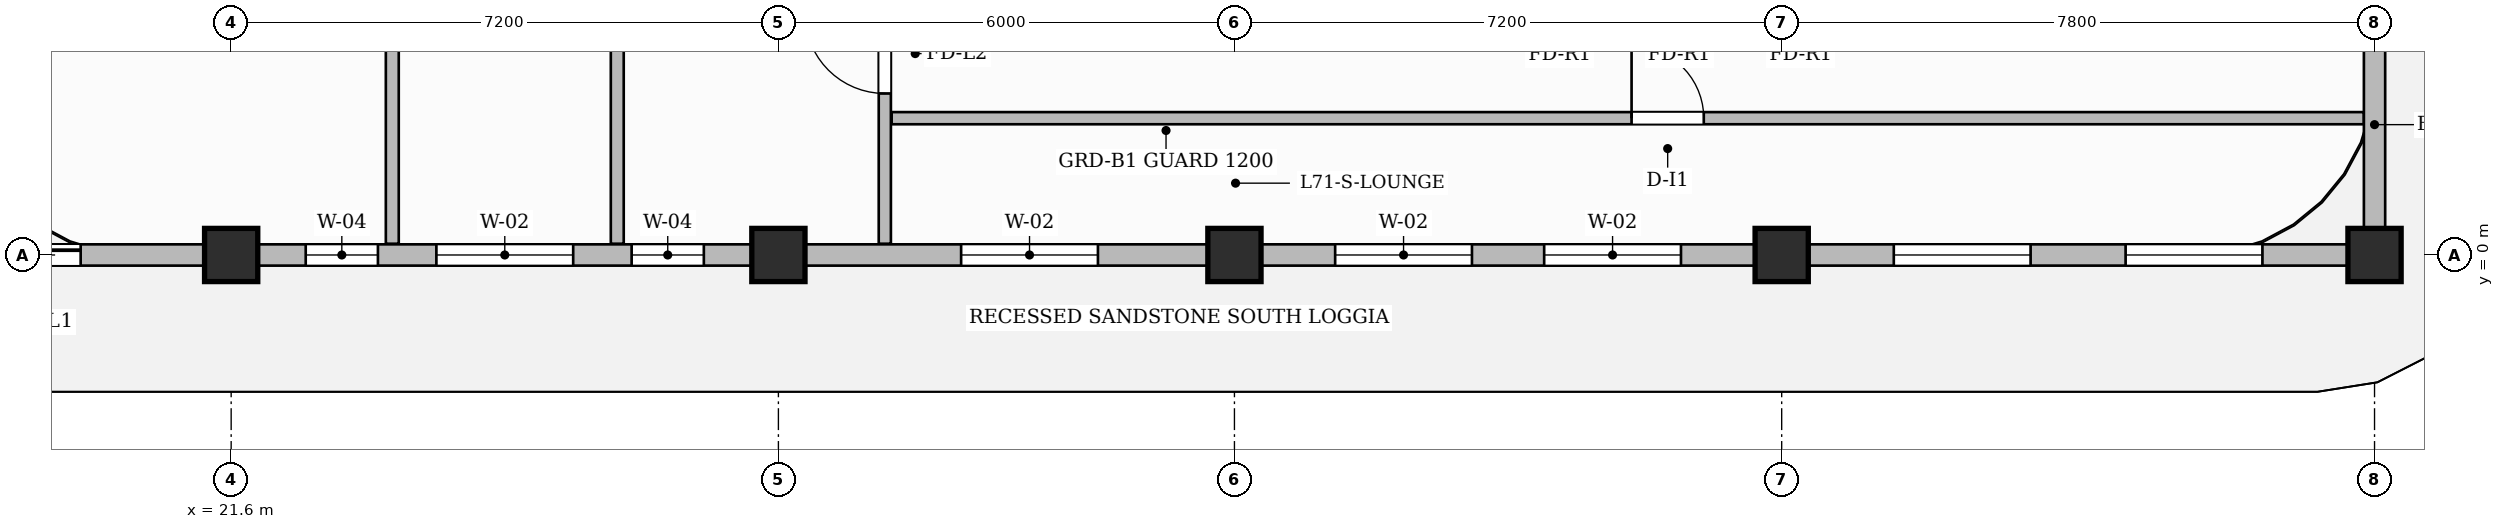
"""IFC4 building model, lengths in metres.
Left out: names, types, materials, properties, quantities, classifications, styles, units other than length and angle.
Written with IfcOpenShell. Run it as: python <this file> out.ifc"""

import sys

from ifc_helpers import new_model, si_unit, direction, frame, frame_2d, origin, origin_2d, place, context, subcontext, project, spatial, rectangle, extrude, source, transform, mapped, element, fill, save


model = new_model("IFC4")
c1 = context("Model", 3, precision=1e-05, world=origin(), true_north=direction((0.0, 1.0)))
c2 = subcontext(c1, "Body", "Model", "MODEL_VIEW")
j1 = project(units=[si_unit("LENGTHUNIT", "METRE"), si_unit("PLANEANGLEUNIT", "RADIAN")], contexts=[c1])
p1 = place(None, origin())
s1 = spatial("IfcSite", under=j1, at=p1, CompositionType="ELEMENT")
p2 = place(p1, origin())
s2 = spatial("IfcBuilding", under=s1, at=p2, CompositionType="ELEMENT")
p3 = place(p2, frame((0.0, 0.0, 282.75)))
s3 = spatial("IfcBuildingStorey", under=s2, at=p3, CompositionType="ELEMENT", Elevation=282.75)
m1 = source(origin(), c2, "Body", "SweptSolid", [
    extrude(rectangle(XDim=0.7, YDim=0.7, at=origin_2d()), origin(), (0.0, 0.0, 1.0), 3.85),
])
for number, where, z_axis, x_axis in (
    (1, (21.6, 0.0, 0.0), (0.0, 0.0, 1.0), (1.0, 0.0, 0.0)),
    (2, (28.8, 0.0, 0.0), (0.0, 0.0, 1.0), (1.0, 0.0, 0.0)),
    (3, (34.8, 0.0, 0.0), (0.0, 0.0, 1.0), (1.0, 0.0, 0.0)),
    (4, (42.0, 0.0, 0.0), (0.0, 0.0, 1.0), (1.0, 0.0, 0.0)),
    (5, (49.8, 0.0, 0.0), (0.0, 0.0, 1.0), (1.0, 0.0, 0.0)),
):
    element("IfcColumn", number, at=place(p3, frame(where, z_axis=z_axis, x_axis=x_axis)), inside=s3, PredefinedType="COLUMN", context=c2, shape_type="MappedRepresentation", body=[
        mapped(m1, transform((0.0, 0.0, 0.0), scale=1.0)),
    ])
p4 = place(p3, frame((30.2, 0.148, 0.0), z_axis=(0.0, 0.0, 1.0), x_axis=(0.0, 1.0, 0.0)))
e6 = element("IfcWall", 6, at=p4, inside=s3, PredefinedType="PARTITIONING", context=c2, shape_type="SweptSolid", body=[
    extrude(rectangle(XDim=9.712, YDim=0.16, at=frame_2d((4.856, 0.0))), origin(), (0.0, 0.0, 1.0), 3.6),
])
p5 = place(p4, frame((1.977, 0.0, 0.0)))
e7 = element("IfcOpeningElement", 7, at=p5, cuts=e6, PredefinedType="OPENING", context=c2, shape_type="SweptSolid", body=[
    extrude(rectangle(XDim=1.05, YDim=2.15, at=frame_2d((0.525, 1.075))), frame((0.0, 0.09, 0.0), z_axis=(0.0, -1.0, 0.0), x_axis=(1.0, 0.0, 0.0)), (0.0, 0.0, 1.0), 0.18),
])
p6 = place(p3, frame((30.29, 1.8, 0.0), z_axis=(0.0, 0.0, 1.0), x_axis=(1.0, 0.0, 0.0)))
e8 = element("IfcWall", 8, at=p6, inside=s3, PredefinedType="PARTITIONING", context=c2, shape_type="SweptSolid", body=[
    extrude(rectangle(XDim=19.37, YDim=0.16, at=frame_2d((9.685, 0.0))), origin(), (0.0, 0.0, 1.0), 3.6),
])
p7 = place(p6, frame((9.735, 0.0, 0.0)))
e9 = element("IfcOpeningElement", 9, at=p7, cuts=e8, PredefinedType="OPENING", context=c2, shape_type="SweptSolid", body=[
    extrude(rectangle(XDim=0.95, YDim=2.15, at=frame_2d((0.475, 1.075))), frame((0.0, 0.09, 0.0), z_axis=(0.0, -1.0, 0.0), x_axis=(1.0, 0.0, 0.0)), (0.0, 0.0, 1.0), 0.18),
])
for number, where, z_axis, x_axis in (
    (10, (23.72, 0.148, 0.0), (0.0, 0.0, 1.0), (0.0, 1.0, 0.0)),
    (11, (26.68, 0.148, 0.0), (0.0, 0.0, 1.0), (0.0, 1.0, 0.0)),
):
    element("IfcWall", number, at=place(p3, frame(where, z_axis=z_axis, x_axis=x_axis)), inside=s3, PredefinedType="PARTITIONING", context=c2, shape_type="SweptSolid", body=[
        extrude(rectangle(XDim=9.712, YDim=0.17, at=frame_2d((4.856, 0.0))), origin(), (0.0, 0.0, 1.0), 3.6),
    ])
p8 = place(p3, frame((18.0, 0.0, 0.0), z_axis=(0.0, 0.0, 1.0), x_axis=(1.0, 0.0, 0.0)))
e12 = element("IfcWall", 12, at=p8, inside=s3, PredefinedType="SOLIDWALL", context=c2, shape_type="SweptSolid", body=[
    extrude(rectangle(XDim=31.8, YDim=0.28, at=frame_2d((15.9, 0.0))), origin(), (0.0, 0.0, 1.0), 3.185),
])
p9 = place(p8, frame((0.42, 0.0, 0.0)))
e13 = element("IfcOpeningElement", 13, at=p9, cuts=e12, PredefinedType="OPENING", context=c2, shape_type="SweptSolid", body=[
    extrude(rectangle(XDim=1.2, YDim=2.2, at=frame_2d((0.6, 1.1))), frame((0.0, 0.15, 0.0), z_axis=(0.0, -1.0, 0.0), x_axis=(1.0, 0.0, 0.0)), (0.0, 0.0, 1.0), 0.3),
])
p10 = place(p8, frame((4.581, 0.0, 0.8)))
e14 = element("IfcOpeningElement", 14, at=p10, cuts=e12, PredefinedType="OPENING", context=c2, shape_type="SweptSolid", body=[
    extrude(rectangle(XDim=0.95, YDim=1.75, at=frame_2d((0.475, 0.875))), frame((0.0, 0.15, 0.0), z_axis=(0.0, -1.0, 0.0), x_axis=(1.0, 0.0, 0.0)), (0.0, 0.0, 1.0), 0.3),
])
p11 = place(p8, frame((6.3, 0.0, 0.8)))
e15 = element("IfcOpeningElement", 15, at=p11, cuts=e12, PredefinedType="OPENING", context=c2, shape_type="SweptSolid", body=[
    extrude(rectangle(XDim=1.8, YDim=1.85, at=frame_2d((0.9, 0.925))), frame((0.0, 0.15, 0.0), z_axis=(0.0, -1.0, 0.0), x_axis=(1.0, 0.0, 0.0)), (0.0, 0.0, 1.0), 0.3),
])
p12 = place(p8, frame((8.869, 0.0, 0.8)))
e16 = element("IfcOpeningElement", 16, at=p12, cuts=e12, PredefinedType="OPENING", context=c2, shape_type="SweptSolid", body=[
    extrude(rectangle(XDim=0.95, YDim=1.75, at=frame_2d((0.475, 0.875))), frame((0.0, 0.15, 0.0), z_axis=(0.0, -1.0, 0.0), x_axis=(1.0, 0.0, 0.0)), (0.0, 0.0, 1.0), 0.3),
])
p13 = place(p8, frame((13.204, 0.0, 0.8)))
e17 = element("IfcOpeningElement", 17, at=p13, cuts=e12, PredefinedType="OPENING", context=c2, shape_type="SweptSolid", body=[
    extrude(rectangle(XDim=1.8, YDim=1.85, at=frame_2d((0.9, 0.925))), frame((0.0, 0.15, 0.0), z_axis=(0.0, -1.0, 0.0), x_axis=(1.0, 0.0, 0.0)), (0.0, 0.0, 1.0), 0.3),
])
p14 = place(p8, frame((18.125, 0.0, 0.8)))
e18 = element("IfcOpeningElement", 18, at=p14, cuts=e12, PredefinedType="OPENING", context=c2, shape_type="SweptSolid", body=[
    extrude(rectangle(XDim=1.8, YDim=1.85, at=frame_2d((0.9, 0.925))), frame((0.0, 0.15, 0.0), z_axis=(0.0, -1.0, 0.0), x_axis=(1.0, 0.0, 0.0)), (0.0, 0.0, 1.0), 0.3),
])
p15 = place(p8, frame((20.875, 0.0, 0.8)))
e19 = element("IfcOpeningElement", 19, at=p15, cuts=e12, PredefinedType="OPENING", context=c2, shape_type="SweptSolid", body=[
    extrude(rectangle(XDim=1.8, YDim=1.85, at=frame_2d((0.9, 0.925))), frame((0.0, 0.15, 0.0), z_axis=(0.0, -1.0, 0.0), x_axis=(1.0, 0.0, 0.0)), (0.0, 0.0, 1.0), 0.3),
])
p16 = place(p8, frame((25.475, 0.0, 0.8)))
e20 = element("IfcOpeningElement", 20, at=p16, cuts=e12, PredefinedType="OPENING", context=c2, shape_type="SweptSolid", body=[
    extrude(rectangle(XDim=1.8, YDim=1.85, at=frame_2d((0.9, 0.925))), frame((0.0, 0.15, 0.0), z_axis=(0.0, -1.0, 0.0), x_axis=(1.0, 0.0, 0.0)), (0.0, 0.0, 1.0), 0.3),
])
p17 = place(p8, frame((28.525, 0.0, 0.8)))
e21 = element("IfcOpeningElement", 21, at=p17, cuts=e12, PredefinedType="OPENING", context=c2, shape_type="SweptSolid", body=[
    extrude(rectangle(XDim=1.8, YDim=1.85, at=frame_2d((0.9, 0.925))), frame((0.0, 0.15, 0.0), z_axis=(0.0, -1.0, 0.0), x_axis=(1.0, 0.0, 0.0)), (0.0, 0.0, 1.0), 0.3),
])
p18 = place(p3, frame((49.8, 0.05, 0.0), z_axis=(0.0, 0.0, 1.0), x_axis=(0.0, 1.0, 0.0)))
e22 = element("IfcWall", 22, at=p18, inside=s3, PredefinedType="SOLIDWALL", context=c2, shape_type="SweptSolid", body=[
    extrude(rectangle(XDim=3.33, YDim=0.28, at=frame_2d((1.665, 0.0))), origin(), (0.0, 0.0, 1.0), 3.6),
])
m2 = source(origin(), c2, "Body", "SweptSolid", [
    extrude(rectangle(XDim=1.05, YDim=2.15, at=frame_2d((0.525, 1.075))), frame((0.0, 0.025, 0.0), z_axis=(0.0, -1.0, 0.0), x_axis=(1.0, 0.0, 0.0)), (0.0, 0.0, 1.0), 0.05),
])
p19 = place(p5, origin())
e23 = element("IfcDoor", 23, at=p19, inside=s3, OperationType="SINGLE_SWING_RIGHT", PredefinedType="DOOR", context=c2, shape_type="MappedRepresentation", body=[
    mapped(m2, transform((0.0, 0.0, 0.0), scale=1.0)),
])
fill(e7, e23)
m3 = source(origin(), c2, "Body", "SweptSolid", [
    extrude(rectangle(XDim=0.95, YDim=2.15, at=frame_2d((0.475, 1.075))), frame((0.0, 0.025, 0.0), z_axis=(0.0, -1.0, 0.0), x_axis=(1.0, 0.0, 0.0)), (0.0, 0.0, 1.0), 0.05),
])
p20 = place(p7, origin())
e24 = element("IfcDoor", 24, at=p20, inside=s3, OperationType="SINGLE_SWING_LEFT", PredefinedType="DOOR", context=c2, shape_type="MappedRepresentation", body=[
    mapped(m3, transform((0.0, 0.0, 0.0), scale=1.0)),
])
fill(e9, e24)
m4 = source(origin(), c2, "Body", "SweptSolid", [
    extrude(rectangle(XDim=1.2, YDim=2.2, at=frame_2d((0.6, 1.1))), frame((0.0, 0.025, 0.0), z_axis=(0.0, -1.0, 0.0), x_axis=(1.0, 0.0, 0.0)), (0.0, 0.0, 1.0), 0.05),
])
p21 = place(p9, origin())
e25 = element("IfcDoor", 25, at=p21, inside=s3, OperationType="SLIDING_TO_LEFT", PredefinedType="DOOR", context=c2, shape_type="MappedRepresentation", body=[
    mapped(m4, transform((0.0, 0.0, 0.0), scale=1.0)),
])
fill(e13, e25)
m5 = source(origin(), c2, "Body", "SweptSolid", [
    extrude(rectangle(XDim=0.95, YDim=1.75, at=frame_2d((0.475, 0.875))), frame((0.0, 0.03, 0.0), z_axis=(0.0, -1.0, 0.0), x_axis=(1.0, 0.0, 0.0)), (0.0, 0.0, 1.0), 0.06),
])
p22 = place(p10, origin())
e26 = element("IfcWindow", 26, at=p22, inside=s3, PartitioningType="SINGLE_PANEL", PredefinedType="WINDOW", context=c2, shape_type="MappedRepresentation", body=[
    mapped(m5, transform((0.0, 0.0, 0.0), scale=1.0)),
])
fill(e14, e26)
m6 = source(origin(), c2, "Body", "SweptSolid", [
    extrude(rectangle(XDim=1.8, YDim=1.85, at=frame_2d((0.9, 0.925))), frame((0.0, 0.03, 0.0), z_axis=(0.0, -1.0, 0.0), x_axis=(1.0, 0.0, 0.0)), (0.0, 0.0, 1.0), 0.06),
])
p23 = place(p11, origin())
e27 = element("IfcWindow", 27, at=p23, inside=s3, PartitioningType="DOUBLE_PANEL_VERTICAL", PredefinedType="WINDOW", context=c2, shape_type="MappedRepresentation", body=[
    mapped(m6, transform((0.0, 0.0, 0.0), scale=1.0)),
])
fill(e15, e27)
p24 = place(p12, origin())
e28 = element("IfcWindow", 28, at=p24, inside=s3, PartitioningType="SINGLE_PANEL", PredefinedType="WINDOW", context=c2, shape_type="MappedRepresentation", body=[
    mapped(m5, transform((0.0, 0.0, 0.0), scale=1.0)),
])
fill(e16, e28)
p25 = place(p13, origin())
e29 = element("IfcWindow", 29, at=p25, inside=s3, PartitioningType="DOUBLE_PANEL_VERTICAL", PredefinedType="WINDOW", context=c2, shape_type="MappedRepresentation", body=[
    mapped(m6, transform((0.0, 0.0, 0.0), scale=1.0)),
])
fill(e17, e29)
p26 = place(p14, origin())
e30 = element("IfcWindow", 30, at=p26, inside=s3, PartitioningType="DOUBLE_PANEL_VERTICAL", PredefinedType="WINDOW", context=c2, shape_type="MappedRepresentation", body=[
    mapped(m6, transform((0.0, 0.0, 0.0), scale=1.0)),
])
fill(e18, e30)
p27 = place(p15, origin())
e31 = element("IfcWindow", 31, at=p27, inside=s3, PartitioningType="DOUBLE_PANEL_VERTICAL", PredefinedType="WINDOW", context=c2, shape_type="MappedRepresentation", body=[
    mapped(m6, transform((0.0, 0.0, 0.0), scale=1.0)),
])
fill(e19, e31)
p28 = place(p16, origin())
e32 = element("IfcWindow", 32, at=p28, inside=s3, PartitioningType="DOUBLE_PANEL_VERTICAL", PredefinedType="WINDOW", context=c2, shape_type="MappedRepresentation", body=[
    mapped(m6, transform((0.0, 0.0, 0.0), scale=1.0)),
])
fill(e20, e32)
p29 = place(p17, origin())
e33 = element("IfcWindow", 33, at=p29, inside=s3, PartitioningType="DOUBLE_PANEL_VERTICAL", PredefinedType="WINDOW", context=c2, shape_type="MappedRepresentation", body=[
    mapped(m6, transform((0.0, 0.0, 0.0), scale=1.0)),
])
fill(e21, e33)
save(model, sys.argv[1])
